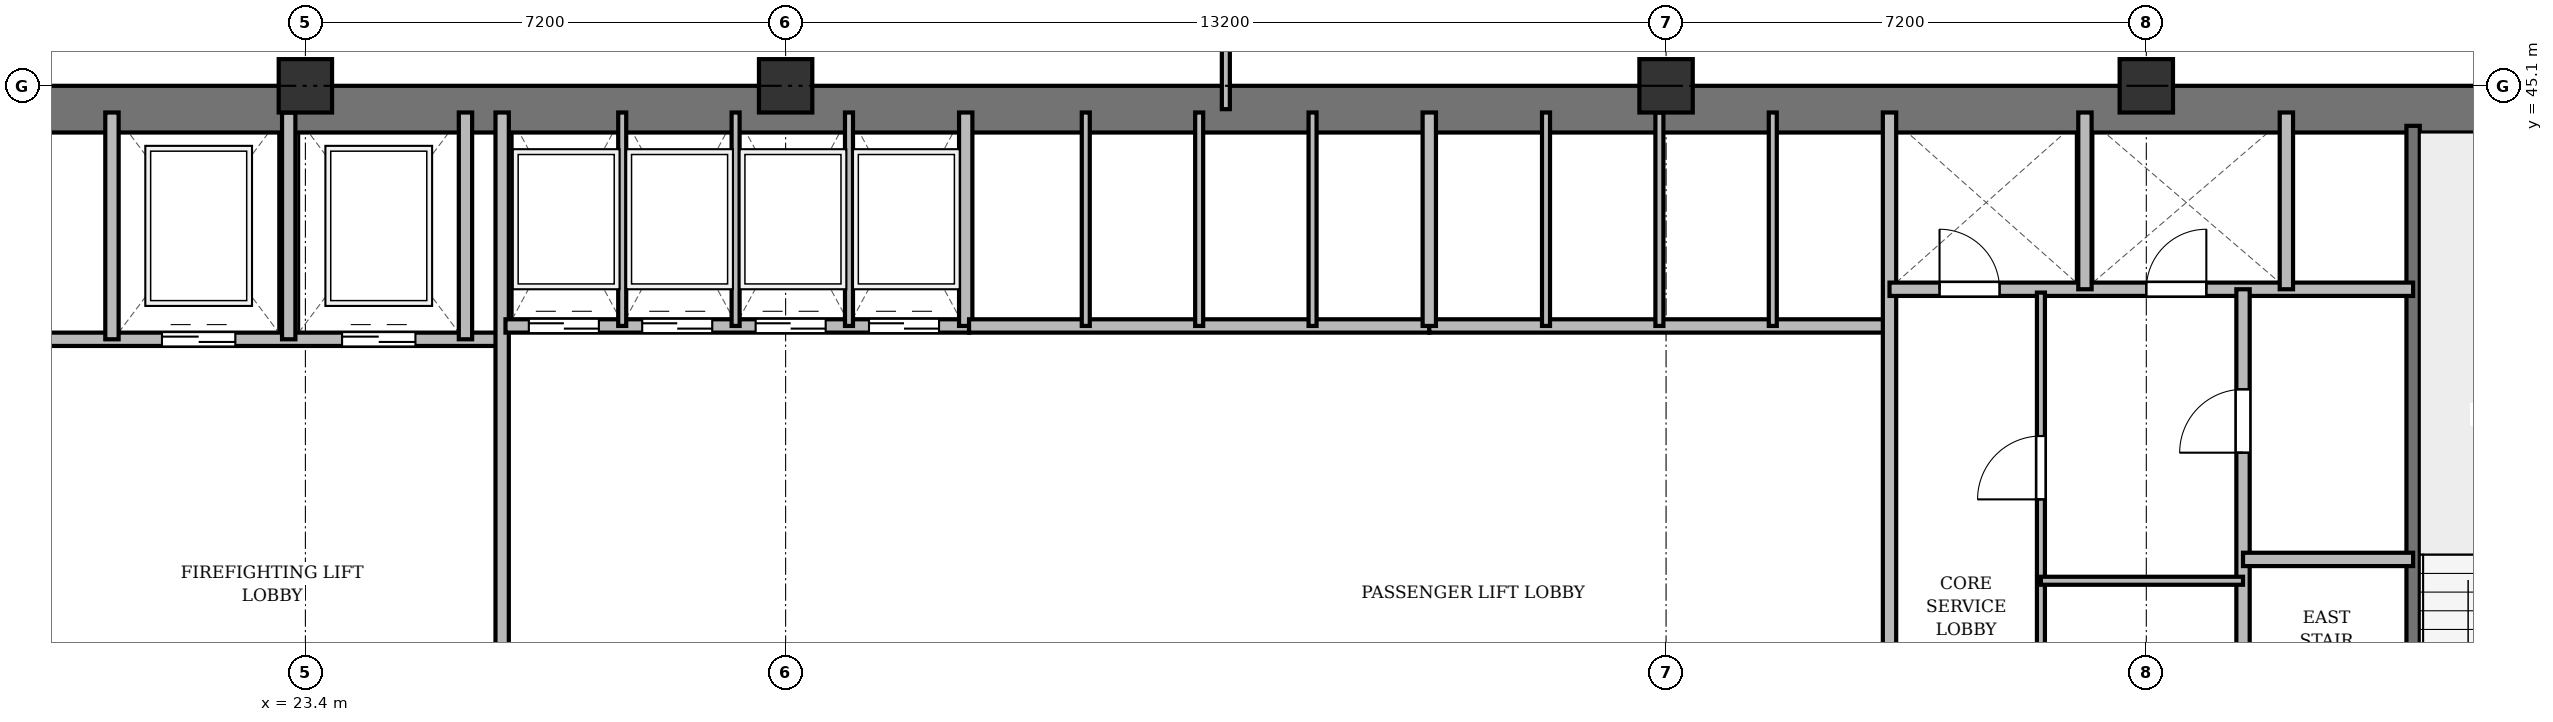
"""IFC4 building model, lengths in metres.
Left out: names, types, materials, properties, quantities, classifications, styles, units other than length and angle.
Written with IfcOpenShell. Run it as: python <this file> out.ifc"""

import sys

from ifc_helpers import new_model, si_unit, direction, frame, frame_2d, origin, origin_2d, place, context, subcontext, project, spatial, rectangle, extrude, source, transform, mapped, element, fill, save


model = new_model("IFC4")
c1 = context("Model", 3, precision=1e-05, world=origin(), true_north=direction((0.0, 1.0)))
c2 = subcontext(c1, "Body", "Model", "MODEL_VIEW")
j1 = project(units=[si_unit("LENGTHUNIT", "METRE"), si_unit("PLANEANGLEUNIT", "RADIAN")], contexts=[c1])
p1 = place(None, origin())
s1 = spatial("IfcSite", under=j1, at=p1, CompositionType="ELEMENT")
p2 = place(p1, origin())
s2 = spatial("IfcBuilding", under=s1, at=p2, CompositionType="ELEMENT")
p3 = place(p2, frame((0.0, 0.0, 103.3)))
s3 = spatial("IfcBuildingStorey", under=s2, at=p3, CompositionType="ELEMENT", Elevation=103.3)
m1 = source(origin(), c2, "Body", "SweptSolid", [
    extrude(rectangle(XDim=0.8, YDim=0.8, at=origin_2d()), origin(), (0.0, 0.0, 1.0), 3.6),
])
for number, where, z_axis, x_axis in (
    (1, (23.4, 45.1, 0.0), (0.0, 0.0, 1.0), (1.0, 0.0, 0.0)),
    (2, (30.6, 45.1, 0.0), (0.0, 0.0, 1.0), (1.0, 0.0, 0.0)),
    (3, (43.8, 45.1, 0.0), (0.0, 0.0, 1.0), (1.0, 0.0, 0.0)),
    (4, (51.0, 45.1, 0.0), (0.0, 0.0, 1.0), (1.0, 0.0, 0.0)),
):
    element("IfcColumn", number, at=place(p3, frame(where, z_axis=z_axis, x_axis=x_axis)), inside=s3, PredefinedType="COLUMN", context=c2, shape_type="MappedRepresentation", body=[
        mapped(m1, transform((0.0, 0.0, 0.0), x_axis=(1.0, 0.0, 0.0), y_axis=(0.0, 1.0, 0.0), z_axis=(0.0, 0.0, 1.0), scale=1.0)),
    ])
p4 = place(p3, frame((15.5, 44.75, 0.0), z_axis=(0.0, 0.0, 1.0), x_axis=(1.0, 0.0, 0.0)))
e5 = element("IfcWall", 5, at=p4, inside=s3, PredefinedType="SHEAR", context=c2, shape_type="SweptSolid", body=[
    extrude(rectangle(XDim=43.4, YDim=0.7, at=frame_2d((21.7, 0.0))), origin(), (0.0, 0.0, 1.0), 3.34),
])
p5 = place(p3, frame((55.0, 33.4, 0.0), z_axis=(0.0, 0.0, 1.0), x_axis=(0.0, 1.0, 0.0)))
e6 = element("IfcWall", 6, at=p5, inside=s3, PredefinedType="SHEAR", context=c2, shape_type="SweptSolid", body=[
    extrude(rectangle(XDim=11.1, YDim=0.2, at=frame_2d((5.55, 0.0))), origin(), (0.0, 0.0, 1.0), 3.34),
])
p6 = place(p5, frame((0.85, 0.0, 0.0)))
e7 = element("IfcOpeningElement", 7, at=p6, cuts=e6, PredefinedType="OPENING", context=c2, shape_type="SweptSolid", body=[
    extrude(rectangle(XDim=1.1, YDim=2.15, at=frame_2d((0.55, 1.075))), frame((0.0, 0.11, 0.0), z_axis=(0.0, -1.0, 0.0), x_axis=(1.0, 0.0, 0.0)), (0.0, 0.0, 1.0), 0.22),
])
p7 = place(p3, frame((19.55, 41.3, 0.0), z_axis=(0.0, 0.0, 1.0), x_axis=(1.0, 0.0, 0.0)))
e8 = element("IfcWall", 8, at=p7, inside=s3, PredefinedType="SOLIDWALL", context=c2, shape_type="SweptSolid", body=[
    extrude(rectangle(XDim=6.75, YDim=0.2, at=frame_2d((3.375, 0.0))), origin(), (0.0, 0.0, 1.0), 3.34),
])
p8 = place(p7, frame((1.7, 0.0, 0.0)))
e9 = element("IfcOpeningElement", 9, at=p8, cuts=e8, PredefinedType="OPENING", context=c2, shape_type="SweptSolid", body=[
    extrude(rectangle(XDim=1.1, YDim=2.15, at=frame_2d((0.55, 1.075))), frame((0.0, 0.11, 0.0), z_axis=(0.0, -1.0, 0.0), x_axis=(1.0, 0.0, 0.0)), (0.0, 0.0, 1.0), 0.22),
])
p9 = place(p7, frame((4.4, 0.0, 0.0)))
e10 = element("IfcOpeningElement", 10, at=p9, cuts=e8, PredefinedType="OPENING", context=c2, shape_type="SweptSolid", body=[
    extrude(rectangle(XDim=1.1, YDim=2.15, at=frame_2d((0.55, 1.075))), frame((0.0, 0.11, 0.0), z_axis=(0.0, -1.0, 0.0), x_axis=(1.0, 0.0, 0.0)), (0.0, 0.0, 1.0), 0.22),
])
for number, where, z_axis, x_axis in (
    (11, (20.5, 41.3, 0.0), (0.0, 0.0, 1.0), (0.0, 1.0, 0.0)),
    (12, (23.15, 41.3, 0.0), (0.0, 0.0, 1.0), (0.0, 1.0, 0.0)),
    (13, (25.8, 41.3, 0.0), (0.0, 0.0, 1.0), (0.0, 1.0, 0.0)),
):
    element("IfcWall", number, at=place(p3, frame(where, z_axis=z_axis, x_axis=x_axis)), inside=s3, PredefinedType="SOLIDWALL", context=c2, shape_type="SweptSolid", body=[
        extrude(rectangle(XDim=3.4, YDim=0.2, at=frame_2d((1.7, 0.0))), origin(), (0.0, 0.0, 1.0), 3.34),
    ])
p10 = place(p3, frame((26.35, 33.4, 0.0), z_axis=(0.0, 0.0, 1.0), x_axis=(0.0, 1.0, 0.0)))
e14 = element("IfcWall", 14, at=p10, inside=s3, PredefinedType="SOLIDWALL", context=c2, shape_type="SweptSolid", body=[
    extrude(rectangle(XDim=11.3, YDim=0.2, at=frame_2d((5.65, 0.0))), origin(), (0.0, 0.0, 1.0), 2.752),
])
p11 = place(p3, frame((26.4, 41.5, 0.0), z_axis=(0.0, 0.0, 1.0), x_axis=(1.0, 0.0, 0.0)))
e15 = element("IfcWall", 15, at=p11, inside=s3, PredefinedType="SOLIDWALL", context=c2, shape_type="SweptSolid", body=[
    extrude(rectangle(XDim=6.95, YDim=0.2, at=frame_2d((3.475, 0.0))), origin(), (0.0, 0.0, 1.0), 3.34),
])
p12 = place(p11, frame((0.35, 0.0, 0.0)))
e16 = element("IfcOpeningElement", 16, at=p12, cuts=e15, PredefinedType="OPENING", context=c2, shape_type="SweptSolid", body=[
    extrude(rectangle(XDim=1.05, YDim=2.15, at=frame_2d((0.525, 1.075))), frame((0.0, 0.11, 0.0), z_axis=(0.0, -1.0, 0.0), x_axis=(1.0, 0.0, 0.0)), (0.0, 0.0, 1.0), 0.22),
])
p13 = place(p11, frame((2.05, 0.0, 0.0)))
e17 = element("IfcOpeningElement", 17, at=p13, cuts=e15, PredefinedType="OPENING", context=c2, shape_type="SweptSolid", body=[
    extrude(rectangle(XDim=1.05, YDim=2.15, at=frame_2d((0.525, 1.075))), frame((0.0, 0.11, 0.0), z_axis=(0.0, -1.0, 0.0), x_axis=(1.0, 0.0, 0.0)), (0.0, 0.0, 1.0), 0.22),
])
p14 = place(p11, frame((3.75, 0.0, 0.0)))
e18 = element("IfcOpeningElement", 18, at=p14, cuts=e15, PredefinedType="OPENING", context=c2, shape_type="SweptSolid", body=[
    extrude(rectangle(XDim=1.05, YDim=2.15, at=frame_2d((0.525, 1.075))), frame((0.0, 0.11, 0.0), z_axis=(0.0, -1.0, 0.0), x_axis=(1.0, 0.0, 0.0)), (0.0, 0.0, 1.0), 0.22),
])
p15 = place(p11, frame((5.45, 0.0, 0.0)))
e19 = element("IfcOpeningElement", 19, at=p15, cuts=e15, PredefinedType="OPENING", context=c2, shape_type="SweptSolid", body=[
    extrude(rectangle(XDim=1.05, YDim=2.15, at=frame_2d((0.525, 1.075))), frame((0.0, 0.11, 0.0), z_axis=(0.0, -1.0, 0.0), x_axis=(1.0, 0.0, 0.0)), (0.0, 0.0, 1.0), 0.22),
])
p16 = place(p3, frame((33.3, 41.5, 0.0), z_axis=(0.0, 0.0, 1.0), x_axis=(0.0, 1.0, 0.0)))
e20 = element("IfcWall", 20, at=p16, inside=s3, PredefinedType="SOLIDWALL", context=c2, shape_type="SweptSolid", body=[
    extrude(rectangle(XDim=3.2, YDim=0.2, at=frame_2d((1.6, 0.0))), origin(), (0.0, 0.0, 1.0), 3.34),
])
for number, where, z_axis, x_axis in (
    (21, (28.15, 41.5, 0.0), (0.0, 0.0, 1.0), (0.0, 1.0, 0.0)),
    (22, (29.85, 41.5, 0.0), (0.0, 0.0, 1.0), (0.0, 1.0, 0.0)),
    (23, (31.55, 41.5, 0.0), (0.0, 0.0, 1.0), (0.0, 1.0, 0.0)),
):
    element("IfcWall", number, at=place(p3, frame(where, z_axis=z_axis, x_axis=x_axis)), inside=s3, PredefinedType="PARTITIONING", context=c2, shape_type="SweptSolid", body=[
        extrude(rectangle(XDim=3.2, YDim=0.12, at=frame_2d((1.6, 0.0))), origin(), (0.0, 0.0, 1.0), 3.34),
    ])
p17 = place(p3, frame((33.35, 41.5, 0.0), z_axis=(0.0, 0.0, 1.0), x_axis=(1.0, 0.0, 0.0)))
e24 = element("IfcWall", 24, at=p17, inside=s3, PredefinedType="SOLIDWALL", context=c2, shape_type="SweptSolid", body=[
    extrude(rectangle(XDim=6.9, YDim=0.2, at=frame_2d((3.45, 0.0))), origin(), (0.0, 0.0, 1.0), 3.34),
])
for number, where, z_axis, x_axis in (
    (25, (35.1, 41.5, 0.0), (0.0, 0.0, 1.0), (0.0, 1.0, 0.0)),
    (26, (36.8, 41.5, 0.0), (0.0, 0.0, 1.0), (0.0, 1.0, 0.0)),
    (27, (38.5, 41.5, 0.0), (0.0, 0.0, 1.0), (0.0, 1.0, 0.0)),
):
    element("IfcWall", number, at=place(p3, frame(where, z_axis=z_axis, x_axis=x_axis)), inside=s3, PredefinedType="PARTITIONING", context=c2, shape_type="SweptSolid", body=[
        extrude(rectangle(XDim=3.2, YDim=0.12, at=frame_2d((1.6, 0.0))), origin(), (0.0, 0.0, 1.0), 3.34),
    ])
p18 = place(p3, frame((40.25, 41.5, 0.0), z_axis=(0.0, 0.0, 1.0), x_axis=(1.0, 0.0, 0.0)))
e28 = element("IfcWall", 28, at=p18, inside=s3, PredefinedType="SOLIDWALL", context=c2, shape_type="SweptSolid", body=[
    extrude(rectangle(XDim=6.9, YDim=0.2, at=frame_2d((3.45, 0.0))), origin(), (0.0, 0.0, 1.0), 2.84),
])
p19 = place(p3, frame((40.25, 41.5, 0.0), z_axis=(0.0, 0.0, 1.0), x_axis=(0.0, 1.0, 0.0)))
e29 = element("IfcWall", 29, at=p19, inside=s3, PredefinedType="SOLIDWALL", context=c2, shape_type="SweptSolid", body=[
    extrude(rectangle(XDim=3.2, YDim=0.2, at=frame_2d((1.6, 0.0))), origin(), (0.0, 0.0, 1.0), 3.34),
])
p20 = place(p3, frame((42.0, 41.5, 0.0), z_axis=(0.0, 0.0, 1.0), x_axis=(0.0, 1.0, 0.0)))
e30 = element("IfcWall", 30, at=p20, inside=s3, PredefinedType="PARTITIONING", context=c2, shape_type="SweptSolid", body=[
    extrude(rectangle(XDim=3.2, YDim=0.12, at=frame_2d((1.6, 0.0))), origin(), (0.0, 0.0, 1.0), 3.34),
])
p21 = place(p3, frame((43.7, 41.5, 0.0), z_axis=(0.0, 0.0, 1.0), x_axis=(0.0, 1.0, 0.0)))
e31 = element("IfcWall", 31, at=p21, inside=s3, PredefinedType="PARTITIONING", context=c2, shape_type="SweptSolid", body=[
    extrude(rectangle(XDim=3.2, YDim=0.12, at=frame_2d((1.6, 0.0))), origin(), (0.0, 0.0, 1.0), 2.84),
])
p22 = place(p3, frame((45.4, 41.5, 0.0), z_axis=(0.0, 0.0, 1.0), x_axis=(0.0, 1.0, 0.0)))
e32 = element("IfcWall", 32, at=p22, inside=s3, PredefinedType="PARTITIONING", context=c2, shape_type="SweptSolid", body=[
    extrude(rectangle(XDim=3.2, YDim=0.12, at=frame_2d((1.6, 0.0))), origin(), (0.0, 0.0, 1.0), 3.34),
])
p23 = place(p3, frame((47.15, 33.4, 0.0), z_axis=(0.0, 0.0, 1.0), x_axis=(0.0, 1.0, 0.0)))
e33 = element("IfcWall", 33, at=p23, inside=s3, PredefinedType="SOLIDWALL", context=c2, shape_type="SweptSolid", body=[
    extrude(rectangle(XDim=11.3, YDim=0.2, at=frame_2d((5.65, 0.0))), origin(), (0.0, 0.0, 1.0), 2.752),
])
p24 = place(p3, frame((47.15, 42.05, 0.0), z_axis=(0.0, 0.0, 1.0), x_axis=(1.0, 0.0, 0.0)))
e34 = element("IfcWall", 34, at=p24, inside=s3, PredefinedType="SOLIDWALL", context=c2, shape_type="SweptSolid", body=[
    extrude(rectangle(XDim=7.85, YDim=0.2, at=frame_2d((3.925, 0.0))), origin(), (0.0, 0.0, 1.0), 2.84),
])
p25 = place(p24, frame((0.75, 0.0, 0.0)))
e35 = element("IfcOpeningElement", 35, at=p25, cuts=e34, PredefinedType="OPENING", context=c2, shape_type="SweptSolid", body=[
    extrude(rectangle(XDim=0.9, YDim=2.1, at=frame_2d((0.45, 1.05))), frame((0.0, 0.11, 0.0), z_axis=(0.0, -1.0, 0.0), x_axis=(1.0, 0.0, 0.0)), (0.0, 0.0, 1.0), 0.22),
])
p26 = place(p24, frame((3.85, 0.0, 0.0)))
e36 = element("IfcOpeningElement", 36, at=p26, cuts=e34, PredefinedType="OPENING", context=c2, shape_type="SweptSolid", body=[
    extrude(rectangle(XDim=0.9, YDim=2.1, at=frame_2d((0.45, 1.05))), frame((0.0, 0.11, 0.0), z_axis=(0.0, -1.0, 0.0), x_axis=(1.0, 0.0, 0.0)), (0.0, 0.0, 1.0), 0.22),
])
for number, where, z_axis, x_axis in (
    (37, (50.08, 42.05, 0.0), (0.0, 0.0, 1.0), (0.0, 1.0, 0.0)),
    (38, (53.1, 42.05, 0.0), (0.0, 0.0, 1.0), (0.0, 1.0, 0.0)),
):
    element("IfcWall", number, at=place(p3, frame(where, z_axis=z_axis, x_axis=x_axis)), inside=s3, PredefinedType="SOLIDWALL", context=c2, shape_type="SweptSolid", body=[
        extrude(rectangle(XDim=2.65, YDim=0.2, at=frame_2d((1.325, 0.0))), origin(), (0.0, 0.0, 1.0), 3.34),
    ])
p27 = place(p3, frame((52.45, 33.4, 0.0), z_axis=(0.0, 0.0, 1.0), x_axis=(0.0, 1.0, 0.0)))
e39 = element("IfcWall", 39, at=p27, inside=s3, PredefinedType="PARTITIONING", context=c2, shape_type="SweptSolid", body=[
    extrude(rectangle(XDim=8.65, YDim=0.2, at=frame_2d((4.325, 0.0))), origin(), (0.0, 0.0, 1.0), 2.752),
])
p28 = place(p27, frame((6.2, 0.0, 0.0)))
e40 = element("IfcOpeningElement", 40, at=p28, cuts=e39, PredefinedType="OPENING", context=c2, shape_type="SweptSolid", body=[
    extrude(rectangle(XDim=0.95, YDim=2.15, at=frame_2d((0.475, 1.075))), frame((0.0, 0.11, 0.0), z_axis=(0.0, -1.0, 0.0), x_axis=(1.0, 0.0, 0.0)), (0.0, 0.0, 1.0), 0.22),
])
p29 = place(p3, frame((52.45, 38.0, 0.0), z_axis=(0.0, 0.0, 1.0), x_axis=(1.0, 0.0, 0.0)))
e41 = element("IfcWall", 41, at=p29, inside=s3, PredefinedType="PARTITIONING", context=c2, shape_type="SweptSolid", body=[
    extrude(rectangle(XDim=2.55, YDim=0.2, at=frame_2d((1.275, 0.0))), origin(), (0.0, 0.0, 1.0), 3.34),
])
p30 = place(p3, frame((49.42, 33.4, 0.0), z_axis=(0.0, 0.0, 1.0), x_axis=(0.0, 1.0, 0.0)))
e42 = element("IfcWall", 42, at=p30, inside=s3, PredefinedType="PARTITIONING", context=c2, shape_type="SweptSolid", body=[
    extrude(rectangle(XDim=8.6, YDim=0.12, at=frame_2d((4.3, 0.0))), origin(), (0.0, 0.0, 1.0), 2.752),
])
p31 = place(p30, frame((1.3, 0.0, 0.0)))
e43 = element("IfcOpeningElement", 43, at=p31, cuts=e42, PredefinedType="OPENING", context=c2, shape_type="SweptSolid", body=[
    extrude(rectangle(XDim=0.95, YDim=2.15, at=frame_2d((0.475, 1.075))), frame((0.0, 0.07, 0.0), z_axis=(0.0, -1.0, 0.0), x_axis=(1.0, 0.0, 0.0)), (0.0, 0.0, 1.0), 0.14),
])
p32 = place(p30, frame((5.5, 0.0, 0.0)))
e44 = element("IfcOpeningElement", 44, at=p32, cuts=e42, PredefinedType="OPENING", context=c2, shape_type="SweptSolid", body=[
    extrude(rectangle(XDim=0.95, YDim=2.15, at=frame_2d((0.475, 1.075))), frame((0.0, 0.07, 0.0), z_axis=(0.0, -1.0, 0.0), x_axis=(1.0, 0.0, 0.0)), (0.0, 0.0, 1.0), 0.14),
])
p33 = place(p3, frame((49.42, 37.68, 0.0), z_axis=(0.0, 0.0, 1.0), x_axis=(1.0, 0.0, 0.0)))
e45 = element("IfcWall", 45, at=p33, inside=s3, PredefinedType="PARTITIONING", context=c2, shape_type="SweptSolid", body=[
    extrude(rectangle(XDim=3.03, YDim=0.12, at=frame_2d((1.515, 0.0))), origin(), (0.0, 0.0, 1.0), 2.84),
])
p34 = place(p3, frame((37.2, 44.75, 0.0), z_axis=(0.0, 0.0, 1.0), x_axis=(0.0, 1.0, 0.0)))
e46 = element("IfcWall", 46, at=p34, inside=s3, PredefinedType="PARTITIONING", context=c2, shape_type="SweptSolid", body=[
    extrude(rectangle(XDim=3.61, YDim=0.12, at=frame_2d((1.805, 0.0))), origin(), (0.0, 0.0, 1.0), 2.752),
])
p35 = place(p34, frame((1.1, 0.0, 0.0)))
e47 = element("IfcOpeningElement", 47, at=p35, cuts=e46, PredefinedType="OPENING", context=c2, shape_type="SweptSolid", body=[
    extrude(rectangle(XDim=0.95, YDim=2.15, at=frame_2d((0.475, 1.075))), frame((0.0, 0.07, 0.0), z_axis=(0.0, -1.0, 0.0), x_axis=(1.0, 0.0, 0.0)), (0.0, 0.0, 1.0), 0.14),
])
m2 = source(origin(), c2, "Body", "SweptSolid", [
    extrude(rectangle(XDim=1.1, YDim=2.15, at=frame_2d((0.55, 1.075))), frame((0.0, 0.025, 0.0), z_axis=(0.0, -1.0, 0.0), x_axis=(1.0, 0.0, 0.0)), (0.0, 0.0, 1.0), 0.05),
])
p36 = place(p8, origin())
e48 = element("IfcDoor", 48, at=p36, inside=s3, OperationType="DOUBLE_DOOR_SLIDING", PredefinedType="DOOR", context=c2, shape_type="MappedRepresentation", body=[
    mapped(m2, transform((0.0, 0.0, 0.0), x_axis=(1.0, 0.0, 0.0), y_axis=(0.0, 1.0, 0.0), z_axis=(0.0, 0.0, 1.0), scale=1.0)),
])
fill(e9, e48)
p37 = place(p9, origin())
e49 = element("IfcDoor", 49, at=p37, inside=s3, OperationType="DOUBLE_DOOR_SLIDING", PredefinedType="DOOR", context=c2, shape_type="MappedRepresentation", body=[
    mapped(m2, transform((0.0, 0.0, 0.0), x_axis=(1.0, 0.0, 0.0), y_axis=(0.0, 1.0, 0.0), z_axis=(0.0, 0.0, 1.0), scale=1.0)),
])
fill(e10, e49)
m3 = source(origin(), c2, "Body", "SweptSolid", [
    extrude(rectangle(XDim=1.05, YDim=2.15, at=frame_2d((0.525, 1.075))), frame((0.0, 0.025, 0.0), z_axis=(0.0, -1.0, 0.0), x_axis=(1.0, 0.0, 0.0)), (0.0, 0.0, 1.0), 0.05),
])
p38 = place(p12, origin())
e50 = element("IfcDoor", 50, at=p38, inside=s3, OperationType="DOUBLE_DOOR_SLIDING", PredefinedType="DOOR", context=c2, shape_type="MappedRepresentation", body=[
    mapped(m3, transform((0.0, 0.0, 0.0), x_axis=(1.0, 0.0, 0.0), y_axis=(0.0, 1.0, 0.0), z_axis=(0.0, 0.0, 1.0), scale=1.0)),
])
fill(e16, e50)
p39 = place(p13, origin())
e51 = element("IfcDoor", 51, at=p39, inside=s3, OperationType="DOUBLE_DOOR_SLIDING", PredefinedType="DOOR", context=c2, shape_type="MappedRepresentation", body=[
    mapped(m3, transform((0.0, 0.0, 0.0), x_axis=(1.0, 0.0, 0.0), y_axis=(0.0, 1.0, 0.0), z_axis=(0.0, 0.0, 1.0), scale=1.0)),
])
fill(e17, e51)
p40 = place(p14, origin())
e52 = element("IfcDoor", 52, at=p40, inside=s3, OperationType="DOUBLE_DOOR_SLIDING", PredefinedType="DOOR", context=c2, shape_type="MappedRepresentation", body=[
    mapped(m3, transform((0.0, 0.0, 0.0), x_axis=(1.0, 0.0, 0.0), y_axis=(0.0, 1.0, 0.0), z_axis=(0.0, 0.0, 1.0), scale=1.0)),
])
fill(e18, e52)
p41 = place(p15, origin())
e53 = element("IfcDoor", 53, at=p41, inside=s3, OperationType="DOUBLE_DOOR_SLIDING", PredefinedType="DOOR", context=c2, shape_type="MappedRepresentation", body=[
    mapped(m3, transform((0.0, 0.0, 0.0), x_axis=(1.0, 0.0, 0.0), y_axis=(0.0, 1.0, 0.0), z_axis=(0.0, 0.0, 1.0), scale=1.0)),
])
fill(e19, e53)
m4 = source(origin(), c2, "Body", "SweptSolid", [
    extrude(rectangle(XDim=0.9, YDim=2.1, at=frame_2d((0.45, 1.05))), frame((0.0, 0.025, 0.0), z_axis=(0.0, -1.0, 0.0), x_axis=(1.0, 0.0, 0.0)), (0.0, 0.0, 1.0), 0.05),
])
p42 = place(p25, origin())
e54 = element("IfcDoor", 54, at=p42, inside=s3, OperationType="SINGLE_SWING_LEFT", PredefinedType="DOOR", context=c2, shape_type="MappedRepresentation", body=[
    mapped(m4, transform((0.0, 0.0, 0.0), x_axis=(1.0, 0.0, 0.0), y_axis=(0.0, 1.0, 0.0), z_axis=(0.0, 0.0, 1.0), scale=1.0)),
])
fill(e35, e54)
p43 = place(p26, origin())
e55 = element("IfcDoor", 55, at=p43, inside=s3, OperationType="SINGLE_SWING_RIGHT", PredefinedType="DOOR", context=c2, shape_type="MappedRepresentation", body=[
    mapped(m4, transform((0.0, 0.0, 0.0), x_axis=(1.0, 0.0, 0.0), y_axis=(0.0, 1.0, 0.0), z_axis=(0.0, 0.0, 1.0), scale=1.0)),
])
fill(e36, e55)
m5 = source(origin(), c2, "Body", "SweptSolid", [
    extrude(rectangle(XDim=0.95, YDim=2.15, at=frame_2d((0.475, 1.075))), frame((0.0, 0.025, 0.0), z_axis=(0.0, -1.0, 0.0), x_axis=(1.0, 0.0, 0.0)), (0.0, 0.0, 1.0), 0.05),
])
p44 = place(p28, origin())
e56 = element("IfcDoor", 56, at=p44, inside=s3, OperationType="SINGLE_SWING_LEFT", PredefinedType="DOOR", context=c2, shape_type="MappedRepresentation", body=[
    mapped(m5, transform((0.0, 0.0, 0.0), x_axis=(1.0, 0.0, 0.0), y_axis=(0.0, 1.0, 0.0), z_axis=(0.0, 0.0, 1.0), scale=1.0)),
])
fill(e40, e56)
p45 = place(p32, origin())
e57 = element("IfcDoor", 57, at=p45, inside=s3, OperationType="SINGLE_SWING_LEFT", PredefinedType="DOOR", context=c2, shape_type="MappedRepresentation", body=[
    mapped(m5, transform((0.0, 0.0, 0.0), x_axis=(1.0, 0.0, 0.0), y_axis=(0.0, 1.0, 0.0), z_axis=(0.0, 0.0, 1.0), scale=1.0)),
])
fill(e44, e57)
save(model, sys.argv[1])
